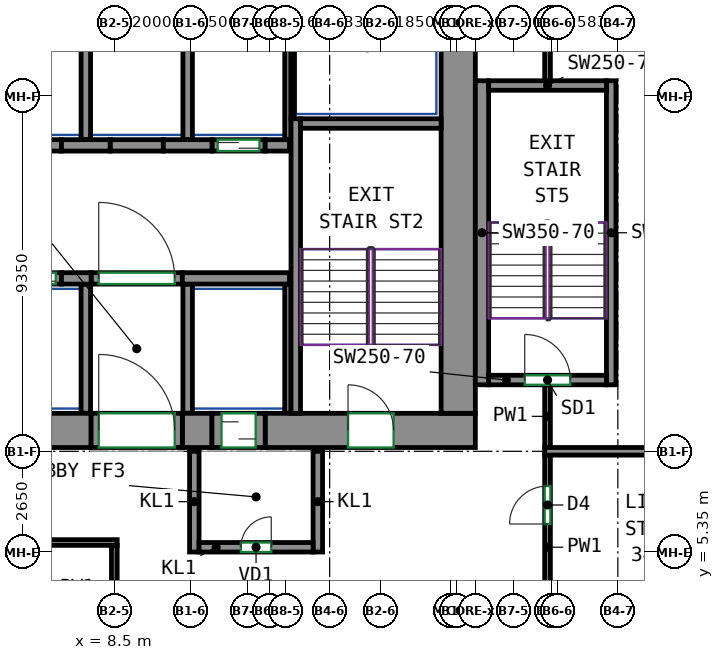
"""IFC4 building model, lengths in metres.
Left out: names, types, materials, properties, quantities, classifications, styles, units other than length and angle.
Written with IfcOpenShell. Run it as: python <this file> out.ifc"""

import sys

from ifc_helpers import new_model, si_unit, direction, frame, frame_2d, origin, place, context, subcontext, project, spatial, rectangle, extrude, source, transform, mapped, element, fill, save


model = new_model("IFC4")
c1 = context("Model", 3, precision=1e-05, world=origin(), true_north=direction((0.0, 1.0)))
c2 = subcontext(c1, "Body", "Model", "MODEL_VIEW")
j1 = project(units=[si_unit("LENGTHUNIT", "METRE"), si_unit("PLANEANGLEUNIT", "RADIAN")], contexts=[c1])
p1 = place(None, origin())
s1 = spatial("IfcSite", under=j1, at=p1, CompositionType="ELEMENT")
p2 = place(p1, origin())
s2 = spatial("IfcBuilding", under=s1, at=p2, CompositionType="ELEMENT")
p3 = place(p2, frame((0.0, 0.0, 150.7)))
s3 = spatial("IfcBuildingStorey", under=s2, at=p3, CompositionType="ELEMENT", Elevation=150.7)
m1 = source(origin(), c2, "Body", "SweptSolid", [
    extrude(rectangle(XDim=14.18, YDim=0.9, at=frame_2d((7.09, 0.0))), origin(), (0.0, 0.0, 1.0), 3.12),
])
p4 = place(p3, frame((-6.29, 8.55, 0.0), z_axis=(0.0, 0.0, 1.0), x_axis=(1.0, 0.0, 0.0)))
e1 = element("IfcWall", 1, at=p4, inside=s3, PredefinedType="SHEAR", context=c2, shape_type="MappedRepresentation", body=[
    mapped(m1, transform((0.0, 0.0, 0.0))),
])
m2 = source(origin(), c2, "Body", "SweptSolid", [
    extrude(rectangle(XDim=0.78, YDim=0.9, at=frame_2d((0.39, 0.0))), origin(), (0.0, 0.0, 1.0), 3.12),
])
p5 = place(p3, frame((10.29, 8.55, 0.0), z_axis=(0.0, 0.0, 1.0), x_axis=(1.0, 0.0, 0.0)))
e2 = element("IfcWall", 2, at=p5, inside=s3, PredefinedType="SHEAR", context=c2, shape_type="MappedRepresentation", body=[
    mapped(m2, transform((0.0, 0.0, 0.0))),
])
m3 = source(origin(), c2, "Body", "SweptSolid", [
    extrude(rectangle(XDim=5.53, YDim=0.9, at=frame_2d((2.765, 0.0))), origin(), (0.0, 0.0, 1.0), 3.12),
])
p6 = place(p3, frame((12.47, 8.55, 0.0), z_axis=(0.0, 0.0, 1.0), x_axis=(1.0, 0.0, 0.0)))
e3 = element("IfcWall", 3, at=p6, inside=s3, PredefinedType="SHEAR", context=c2, shape_type="MappedRepresentation", body=[
    mapped(m3, transform((0.0, 0.0, 0.0))),
])
p7 = place(p6, frame((2.18, 0.0, 0.0)))
e4 = element("IfcOpeningElement", 4, at=p7, cuts=e3, PredefinedType="OPENING", context=c2, shape_type="SweptSolid", body=[
    extrude(rectangle(XDim=1.2, YDim=2.1, at=frame_2d((0.6, 1.05))), frame((0.0, 0.46, 0.0), z_axis=(0.0, -1.0, 0.0), x_axis=(1.0, 0.0, 0.0)), (0.0, 0.0, 1.0), 0.92),
])
m4 = source(origin(), c2, "Body", "SweptSolid", [
    extrude(rectangle(XDim=12.0, YDim=0.9, at=frame_2d((6.0, 0.0))), origin(), (0.0, 0.0, 1.0), 3.12),
])
p8 = place(p3, frame((17.55, 9.0, 0.0), z_axis=(0.0, 0.0, 1.0), x_axis=(0.0, 1.0, 0.0)))
e5 = element("IfcWall", 5, at=p8, inside=s3, PredefinedType="SHEAR", context=c2, shape_type="MappedRepresentation", body=[
    mapped(m4, transform((0.0, 0.0, 0.0))),
])
m5 = source(origin(), c2, "Body", "SweptSolid", [
    extrude(rectangle(XDim=7.75, YDim=0.25, at=frame_2d((3.875, 0.0))), origin(), (0.0, 0.0, 1.0), 3.12),
])
p9 = place(p3, frame((13.275, 9.0, 0.0), z_axis=(0.0, 0.0, 1.0), x_axis=(0.0, 1.0, 0.0)))
e6 = element("IfcWall", 6, at=p9, inside=s3, PredefinedType="SHEAR", context=c2, shape_type="MappedRepresentation", body=[
    mapped(m5, transform((0.0, 0.0, 0.0))),
])
m6 = source(origin(), c2, "Body", "SweptSolid", [
    extrude(rectangle(XDim=3.7, YDim=0.25, at=frame_2d((1.85, 0.0))), origin(), (0.0, 0.0, 1.0), 3.12),
])
p10 = place(p3, frame((13.4, 16.625, 0.0), z_axis=(0.0, 0.0, 1.0), x_axis=(1.0, 0.0, 0.0)))
e7 = element("IfcWall", 7, at=p10, inside=s3, PredefinedType="SHEAR", context=c2, shape_type="MappedRepresentation", body=[
    mapped(m6, transform((0.0, 0.0, 0.0))),
])
m7 = source(origin(), c2, "Body", "SweptSolid", [
    extrude(rectangle(XDim=8.0, YDim=0.35, at=frame_2d((4.0, 0.0))), origin(), (0.0, 0.0, 1.0), 3.12),
])
p11 = place(p3, frame((18.175, 9.75, 0.0), z_axis=(0.0, 0.0, 1.0), x_axis=(0.0, 1.0, 0.0)))
e8 = element("IfcWall", 8, at=p11, inside=s3, PredefinedType="SHEAR", context=c2, shape_type="MappedRepresentation", body=[
    mapped(m7, transform((0.0, 0.0, 0.0))),
])
m8 = source(origin(), c2, "Body", "SweptSolid", [
    extrude(rectangle(XDim=8.0, YDim=0.25, at=frame_2d((4.0, 0.0))), origin(), (0.0, 0.0, 1.0), 3.12),
])
p12 = place(p3, frame((21.575, 9.75, 0.0), z_axis=(0.0, 0.0, 1.0), x_axis=(0.0, 1.0, 0.0)))
e9 = element("IfcWall", 9, at=p12, inside=s3, PredefinedType="SHEAR", context=c2, shape_type="MappedRepresentation", body=[
    mapped(m8, transform((0.0, 0.0, 0.0))),
])
m9 = source(origin(), c2, "Body", "SweptSolid", [
    extrude(rectangle(XDim=3.1, YDim=0.25, at=frame_2d((1.55, 0.0))), origin(), (0.0, 0.0, 1.0), 3.12),
])
p13 = place(p3, frame((18.35, 9.875, 0.0), z_axis=(0.0, 0.0, 1.0), x_axis=(1.0, 0.0, 0.0)))
e10 = element("IfcWall", 10, at=p13, inside=s3, PredefinedType="SHEAR", context=c2, shape_type="MappedRepresentation", body=[
    mapped(m9, transform((0.0, 0.0, 0.0))),
])
p14 = place(p13, frame((0.95, 0.0, 0.0)))
e11 = element("IfcOpeningElement", 11, at=p14, cuts=e10, PredefinedType="OPENING", context=c2, shape_type="SweptSolid", body=[
    extrude(rectangle(XDim=1.2, YDim=2.1, at=frame_2d((0.6, 1.05))), frame((0.0, 0.135, 0.0), z_axis=(0.0, -1.0, 0.0), x_axis=(1.0, 0.0, 0.0)), (0.0, 0.0, 1.0), 0.27),
])
p15 = place(p3, frame((18.35, 17.625, 0.0), z_axis=(0.0, 0.0, 1.0), x_axis=(1.0, 0.0, 0.0)))
e12 = element("IfcWall", 12, at=p15, inside=s3, PredefinedType="SHEAR", context=c2, shape_type="MappedRepresentation", body=[
    mapped(m9, transform((0.0, 0.0, 0.0))),
])
m10 = source(origin(), c2, "Body", "SweptSolid", [
    extrude(rectangle(XDim=0.78, YDim=0.3, at=frame_2d((0.39, 0.0))), origin(), (0.0, 0.0, 1.0), 3.12),
])
p16 = place(p3, frame((7.11, 12.55, 0.0), z_axis=(0.0, 0.0, 1.0), x_axis=(1.0, 0.0, 0.0)))
e13 = element("IfcWall", 13, at=p16, inside=s3, PredefinedType="SHEAR", context=c2, shape_type="MappedRepresentation", body=[
    mapped(m10, transform((0.0, 0.0, 0.0))),
])
m11 = source(origin(), c2, "Body", "SweptSolid", [
    extrude(rectangle(XDim=2.82, YDim=0.3, at=frame_2d((1.41, 0.0))), origin(), (0.0, 0.0, 1.0), 3.12),
])
p17 = place(p3, frame((10.29, 12.55, 0.0), z_axis=(0.0, 0.0, 1.0), x_axis=(1.0, 0.0, 0.0)))
e14 = element("IfcWall", 14, at=p17, inside=s3, PredefinedType="SHEAR", context=c2, shape_type="MappedRepresentation", body=[
    mapped(m11, transform((0.0, 0.0, 0.0))),
])
m12 = source(origin(), c2, "Body", "SweptSolid", [
    extrude(rectangle(XDim=1.28, YDim=0.3, at=frame_2d((0.64, 0.0))), origin(), (0.0, 0.0, 1.0), 3.12),
])
p18 = place(p3, frame((7.11, 16.05, 0.0), z_axis=(0.0, 0.0, 1.0), x_axis=(1.0, 0.0, 0.0)))
e15 = element("IfcWall", 15, at=p18, inside=s3, PredefinedType="SHEAR", context=c2, shape_type="MappedRepresentation", body=[
    mapped(m12, transform((0.0, 0.0, 0.0))),
])
m13 = source(origin(), c2, "Body", "SweptSolid", [
    extrude(rectangle(XDim=1.28, YDim=0.3, at=frame_2d((0.64, 0.0))), origin(), (0.0, 0.0, 1.0), 3.12),
])
p19 = place(p3, frame((9.79, 16.05, 0.0), z_axis=(0.0, 0.0, 1.0), x_axis=(1.0, 0.0, 0.0)))
e16 = element("IfcWall", 16, at=p19, inside=s3, PredefinedType="SHEAR", context=c2, shape_type="MappedRepresentation", body=[
    mapped(m13, transform((0.0, 0.0, 0.0))),
])
m14 = source(origin(), c2, "Body", "SweptSolid", [
    extrude(rectangle(XDim=0.64, YDim=0.3, at=frame_2d((0.32, 0.0))), origin(), (0.0, 0.0, 1.0), 3.12),
])
p20 = place(p3, frame((12.47, 16.05, 0.0), z_axis=(0.0, 0.0, 1.0), x_axis=(1.0, 0.0, 0.0)))
e17 = element("IfcWall", 17, at=p20, inside=s3, PredefinedType="SHEAR", context=c2, shape_type="MappedRepresentation", body=[
    mapped(m14, transform((0.0, 0.0, 0.0))),
])
m15 = source(origin(), c2, "Body", "SweptSolid", [
    extrude(rectangle(XDim=1.4, YDim=0.3, at=frame_2d((0.7, 0.0))), origin(), (0.0, 0.0, 1.0), 3.12),
])
p21 = place(p3, frame((5.71, 12.55, 0.0), z_axis=(0.0, 0.0, 1.0), x_axis=(1.0, 0.0, 0.0)))
e18 = element("IfcWall", 18, at=p21, inside=s3, PredefinedType="PARTITIONING", context=c2, shape_type="MappedRepresentation", body=[
    mapped(m15, transform((0.0, 0.0, 0.0))),
])
p22 = place(p21, frame((0.15, 0.0, 0.0)))
e19 = element("IfcOpeningElement", 19, at=p22, cuts=e18, PredefinedType="OPENING", context=c2, shape_type="SweptSolid", body=[
    extrude(rectangle(XDim=1.1, YDim=2.1, at=frame_2d((0.55, 1.05))), frame((0.0, 0.16, 0.0), z_axis=(0.0, -1.0, 0.0), x_axis=(1.0, 0.0, 0.0)), (0.0, 0.0, 1.0), 0.32),
])
m16 = source(origin(), c2, "Body", "SweptSolid", [
    extrude(rectangle(XDim=1.4, YDim=0.3, at=frame_2d((0.7, 0.0))), origin(), (0.0, 0.0, 1.0), 3.12),
])
p23 = place(p3, frame((11.07, 16.05, 0.0), z_axis=(0.0, 0.0, 1.0), x_axis=(1.0, 0.0, 0.0)))
e20 = element("IfcWall", 20, at=p23, inside=s3, PredefinedType="PARTITIONING", context=c2, shape_type="MappedRepresentation", body=[
    mapped(m16, transform((0.0, 0.0, 0.0))),
])
p24 = place(p23, frame((0.15, 0.0, 0.0)))
e21 = element("IfcOpeningElement", 21, at=p24, cuts=e20, PredefinedType="OPENING", context=c2, shape_type="SweptSolid", body=[
    extrude(rectangle(XDim=1.1, YDim=2.1, at=frame_2d((0.55, 1.05))), frame((0.0, 0.16, 0.0), z_axis=(0.0, -1.0, 0.0), x_axis=(1.0, 0.0, 0.0)), (0.0, 0.0, 1.0), 0.32),
])
m17 = source(origin(), c2, "Body", "SweptSolid", [
    extrude(rectangle(XDim=2.4, YDim=0.3, at=frame_2d((1.2, 0.0))), origin(), (0.0, 0.0, 1.0), 3.12),
])
p25 = place(p3, frame((7.89, 12.55, 0.0), z_axis=(0.0, 0.0, 1.0), x_axis=(1.0, 0.0, 0.0)))
e22 = element("IfcWall", 22, at=p25, inside=s3, PredefinedType="PARTITIONING", context=c2, shape_type="MappedRepresentation", body=[
    mapped(m17, transform((0.0, 0.0, 0.0))),
])
p26 = place(p25, frame((0.2, 0.0, 0.0)))
e23 = element("IfcOpeningElement", 23, at=p26, cuts=e22, PredefinedType="OPENING", context=c2, shape_type="SweptSolid", body=[
    extrude(rectangle(XDim=2.0, YDim=2.1, at=frame_2d((1.0, 1.05))), frame((0.0, 0.16, 0.0), z_axis=(0.0, -1.0, 0.0), x_axis=(1.0, 0.0, 0.0)), (0.0, 0.0, 1.0), 0.32),
])
for number, where, z_axis, x_axis in (
    (24, (5.71, 16.05, 0.0), (0.0, 0.0, 1.0), (1.0, 0.0, 0.0)),
    (25, (8.39, 16.05, 0.0), (0.0, 0.0, 1.0), (1.0, 0.0, 0.0)),
):
    element("IfcWall", number, at=place(p3, frame(where, z_axis=z_axis, x_axis=x_axis)), inside=s3, PredefinedType="PARTITIONING", context=c2, shape_type="MappedRepresentation", body=[
        mapped(m15, transform((0.0, 0.0, 0.0))),
    ])
m18 = source(origin(), c2, "Body", "SweptSolid", [
    extrude(rectangle(XDim=2.65, YDim=0.25, at=frame_2d((1.325, 0.0))), origin(), (0.0, 0.0, 1.0), 3.12),
])
for number, where, z_axis, x_axis in (
    (26, (10.605, 5.35, 0.0), (0.0, 0.0, 1.0), (0.0, 1.0, 0.0)),
    (27, (13.855, 5.35, 0.0), (0.0, 0.0, 1.0), (0.0, 1.0, 0.0)),
):
    element("IfcWall", number, at=place(p3, frame(where, z_axis=z_axis, x_axis=x_axis)), inside=s3, PredefinedType="PARTITIONING", context=c2, shape_type="MappedRepresentation", body=[
        mapped(m18, transform((0.0, 0.0, 0.0))),
    ])
m19 = source(origin(), c2, "Body", "SweptSolid", [
    extrude(rectangle(XDim=3.0, YDim=0.25, at=frame_2d((1.5, 0.0))), origin(), (0.0, 0.0, 1.0), 3.12),
])
p27 = place(p3, frame((10.73, 5.475, 0.0), z_axis=(0.0, 0.0, 1.0), x_axis=(1.0, 0.0, 0.0)))
e28 = element("IfcWall", 28, at=p27, inside=s3, PredefinedType="PARTITIONING", context=c2, shape_type="MappedRepresentation", body=[
    mapped(m19, transform((0.0, 0.0, 0.0))),
])
p28 = place(p27, frame((1.1, 0.0, 0.0)))
e29 = element("IfcOpeningElement", 29, at=p28, cuts=e28, PredefinedType="OPENING", context=c2, shape_type="SweptSolid", body=[
    extrude(rectangle(XDim=0.8, YDim=2.0, at=frame_2d((0.4, 1.0))), frame((0.0, 0.135, 0.0), z_axis=(0.0, -1.0, 0.0), x_axis=(1.0, 0.0, 0.0)), (0.0, 0.0, 1.0), 0.27),
])
m20 = source(origin(), c2, "Body", "SweptSolid", [
    extrude(rectangle(XDim=3.275, YDim=0.165, at=frame_2d((1.638, 0.0))), origin(), (0.0, 0.0, 1.0), 3.12),
])
p29 = place(p3, frame((13.067, 16.2, 0.0), z_axis=(0.0, 0.0, 1.0), x_axis=(0.0, 1.0, 0.0)))
e30 = element("IfcWall", 30, at=p29, inside=s3, PredefinedType="PARTITIONING", context=c2, shape_type="MappedRepresentation", body=[
    mapped(m20, transform((0.0, 0.0, 0.0))),
])
m21 = source(origin(), c2, "Body", "SweptSolid", [
    extrude(rectangle(XDim=3.275, YDim=0.25, at=frame_2d((1.638, 0.0))), origin(), (0.0, 0.0, 1.0), 3.12),
])
p30 = place(p3, frame((10.43, 16.2, 0.0), z_axis=(0.0, 0.0, 1.0), x_axis=(0.0, 1.0, 0.0)))
e31 = element("IfcWall", 31, at=p30, inside=s3, PredefinedType="PARTITIONING", context=c2, shape_type="MappedRepresentation", body=[
    mapped(m21, transform((0.0, 0.0, 0.0))),
])
m22 = source(origin(), c2, "Body", "SweptSolid", [
    extrude(rectangle(XDim=2.725, YDim=0.085, at=frame_2d((1.363, 0.0))), origin(), (0.0, 0.0, 1.0), 3.12),
])
p31 = place(p3, frame((13.192, 16.75, 0.0), z_axis=(0.0, 0.0, 1.0), x_axis=(0.0, 1.0, 0.0)))
e32 = element("IfcWall", 32, at=p31, inside=s3, PredefinedType="PARTITIONING", context=c2, shape_type="MappedRepresentation", body=[
    mapped(m22, transform((0.0, 0.0, 0.0))),
])
p32 = place(p3, frame((7.75, 16.2, 0.0), z_axis=(0.0, 0.0, 1.0), x_axis=(0.0, 1.0, 0.0)))
e33 = element("IfcWall", 33, at=p32, inside=s3, PredefinedType="PARTITIONING", context=c2, shape_type="MappedRepresentation", body=[
    mapped(m21, transform((0.0, 0.0, 0.0))),
])
m23 = source(origin(), c2, "Body", "SweptSolid", [
    extrude(rectangle(XDim=3.4, YDim=0.25, at=frame_2d((1.7, 0.0))), origin(), (0.0, 0.0, 1.0), 3.12),
])
p33 = place(p3, frame((10.43, 9.0, 0.0), z_axis=(0.0, 0.0, 1.0), x_axis=(0.0, 1.0, 0.0)))
e34 = element("IfcWall", 34, at=p33, inside=s3, PredefinedType="PARTITIONING", context=c2, shape_type="MappedRepresentation", body=[
    mapped(m23, transform((0.0, 0.0, 0.0))),
])
m24 = source(origin(), c2, "Body", "SweptSolid", [
    extrude(rectangle(XDim=3.4, YDim=0.165, at=frame_2d((1.7, 0.0))), origin(), (0.0, 0.0, 1.0), 3.12),
])
p34 = place(p3, frame((13.067, 9.0, 0.0), z_axis=(0.0, 0.0, 1.0), x_axis=(0.0, 1.0, 0.0)))
e35 = element("IfcWall", 35, at=p34, inside=s3, PredefinedType="PARTITIONING", context=c2, shape_type="MappedRepresentation", body=[
    mapped(m24, transform((0.0, 0.0, 0.0))),
])
p35 = place(p3, frame((7.75, 9.0, 0.0), z_axis=(0.0, 0.0, 1.0), x_axis=(0.0, 1.0, 0.0)))
e36 = element("IfcWall", 36, at=p35, inside=s3, PredefinedType="PARTITIONING", context=c2, shape_type="MappedRepresentation", body=[
    mapped(m23, transform((0.0, 0.0, 0.0))),
])
m25 = source(origin(), c2, "Body", "SweptSolid", [
    extrude(rectangle(XDim=2.4, YDim=0.9, at=frame_2d((1.2, 0.0))), origin(), (0.0, 0.0, 1.0), 2.7),
])
p36 = place(p3, frame((7.89, 8.55, 0.0), z_axis=(0.0, 0.0, 1.0), x_axis=(1.0, 0.0, 0.0)))
e37 = element("IfcWall", 37, at=p36, inside=s3, PredefinedType="PARTITIONING", context=c2, shape_type="MappedRepresentation", body=[
    mapped(m25, transform((0.0, 0.0, 0.0))),
])
p37 = place(p36, frame((0.2, 0.0, 0.0)))
e38 = element("IfcOpeningElement", 38, at=p37, cuts=e37, PredefinedType="OPENING", context=c2, shape_type="SweptSolid", body=[
    extrude(rectangle(XDim=2.0, YDim=2.1, at=frame_2d((1.0, 1.05))), frame((0.0, 0.46, 0.0), z_axis=(0.0, -1.0, 0.0), x_axis=(1.0, 0.0, 0.0)), (0.0, 0.0, 1.0), 0.92),
])
m26 = source(origin(), c2, "Body", "SweptSolid", [
    extrude(rectangle(XDim=1.4, YDim=0.9, at=frame_2d((0.7, 0.0))), origin(), (0.0, 0.0, 1.0), 2.7),
])
p38 = place(p3, frame((11.07, 8.55, 0.0), z_axis=(0.0, 0.0, 1.0), x_axis=(1.0, 0.0, 0.0)))
e39 = element("IfcWall", 39, at=p38, inside=s3, PredefinedType="PARTITIONING", context=c2, shape_type="MappedRepresentation", body=[
    mapped(m26, transform((0.0, 0.0, 0.0))),
])
p39 = place(p38, frame((0.25, 0.0, 0.0)))
e40 = element("IfcOpeningElement", 40, at=p39, cuts=e39, PredefinedType="OPENING", context=c2, shape_type="SweptSolid", body=[
    extrude(rectangle(XDim=0.9, YDim=2.1, at=frame_2d((0.45, 1.05))), frame((0.0, 0.46, 0.0), z_axis=(0.0, -1.0, 0.0), x_axis=(1.0, 0.0, 0.0)), (0.0, 0.0, 1.0), 0.92),
])
p40 = place(p3, frame((19.9, 4.434, 0.0), z_axis=(0.0, 0.0, 1.0), x_axis=(0.0, 1.0, 0.0)))
e41 = element("IfcWall", 41, at=p40, inside=s3, PredefinedType="PARTITIONING", context=c2, shape_type="SweptSolid", body=[
    extrude(rectangle(XDim=3.476, YDim=0.15, at=frame_2d((1.738, 0.0))), origin(), (0.0, 0.0, 1.0), 3.12),
])
p41 = place(p40, frame((1.653, 0.0, 0.0)))
e42 = element("IfcOpeningElement", 42, at=p41, cuts=e41, PredefinedType="OPENING", context=c2, shape_type="SweptSolid", body=[
    extrude(rectangle(XDim=1.0, YDim=2.1, at=frame_2d((0.5, 1.05))), frame((0.0, 0.085, 0.0), z_axis=(0.0, -1.0, 0.0), x_axis=(1.0, 0.0, 0.0)), (0.0, 0.0, 1.0), 0.17),
])
p42 = place(p3, frame((19.9, 17.75, 0.0), z_axis=(0.0, 0.0, 1.0), x_axis=(0.0, 1.0, 0.0)))
e43 = element("IfcWall", 43, at=p42, inside=s3, PredefinedType="PARTITIONING", context=c2, shape_type="SweptSolid", body=[
    extrude(rectangle(XDim=4.175, YDim=0.15, at=frame_2d((2.087, 0.0))), origin(), (0.0, 0.0, 1.0), 3.12),
])
p43 = place(p42, frame((1.432, 0.0, 0.0)))
e44 = element("IfcOpeningElement", 44, at=p43, cuts=e43, PredefinedType="OPENING", context=c2, shape_type="SweptSolid", body=[
    extrude(rectangle(XDim=0.9, YDim=2.1, at=frame_2d((0.45, 1.05))), frame((0.0, 0.085, 0.0), z_axis=(0.0, -1.0, 0.0), x_axis=(1.0, 0.0, 0.0)), (0.0, 0.0, 1.0), 0.17),
])
p44 = place(p3, frame((19.9, 8.09, 0.0), z_axis=(0.0, 0.0, 1.0), x_axis=(0.0, 1.0, 0.0)))
e45 = element("IfcWall", 45, at=p44, inside=s3, PredefinedType="PARTITIONING", context=c2, shape_type="SweptSolid", body=[
    extrude(rectangle(XDim=1.66, YDim=0.15, at=frame_2d((0.83, 0.0))), origin(), (0.0, 0.0, 1.0), 3.12),
])
p45 = place(p3, frame((8.5, 5.525, 0.0), z_axis=(0.0, 0.0, 1.0), x_axis=(0.0, -1.0, 0.0)))
e46 = element("IfcWall", 46, at=p45, inside=s3, PredefinedType="PARTITIONING", context=c2, shape_type="SweptSolid", body=[
    extrude(rectangle(XDim=2.25, YDim=0.15, at=frame_2d((1.125, 0.0))), origin(), (0.0, 0.0, 1.0), 3.12),
])
p46 = place(p3, frame((-5.4, 5.6, 0.0), z_axis=(0.0, 0.0, 1.0), x_axis=(1.0, 0.0, 0.0)))
e47 = element("IfcWall", 47, at=p46, inside=s3, PredefinedType="PARTITIONING", context=c2, shape_type="SweptSolid", body=[
    extrude(rectangle(XDim=13.975, YDim=0.15, at=frame_2d((6.987, 0.0))), origin(), (0.0, 0.0, 1.0), 3.12),
])
p47 = place(p46, frame((4.626, 0.0, 0.0)))
e48 = element("IfcOpeningElement", 48, at=p47, cuts=e47, PredefinedType="OPENING", context=c2, shape_type="SweptSolid", body=[
    extrude(rectangle(XDim=1.0, YDim=2.1, at=frame_2d((0.5, 1.05))), frame((0.0, 0.085, 0.0), z_axis=(0.0, -1.0, 0.0), x_axis=(1.0, 0.0, 0.0)), (0.0, 0.0, 1.0), 0.17),
])
p48 = place(p3, frame((19.827, 8.0, 0.0), z_axis=(0.0, 0.0, 1.0), x_axis=(1.0, 0.0, 0.0)))
e49 = element("IfcWall", 49, at=p48, inside=s3, PredefinedType="PARTITIONING", context=c2, shape_type="SweptSolid", body=[
    extrude(rectangle(XDim=4.573, YDim=0.2, at=frame_2d((2.287, 0.0))), origin(), (0.0, 0.0, 1.0), 3.12),
])
p49 = place(p26, origin())
e50 = element("IfcDoor", 50, at=p49, inside=s3, OperationType="DOUBLE_DOOR_SINGLE_SWING", PredefinedType="DOOR", context=c2, shape_type="SweptSolid", body=[
    extrude(rectangle(XDim=2.0, YDim=2.1, at=frame_2d((1.0, 1.05))), frame((0.0, 0.025, 0.0), z_axis=(0.0, -1.0, 0.0), x_axis=(1.0, 0.0, 0.0)), (0.0, 0.0, 1.0), 0.05),
])
fill(e23, e50)
p50 = place(p37, origin())
e51 = element("IfcDoor", 51, at=p50, inside=s3, OperationType="DOUBLE_DOOR_SINGLE_SWING", PredefinedType="DOOR", context=c2, shape_type="SweptSolid", body=[
    extrude(rectangle(XDim=2.0, YDim=2.1, at=frame_2d((1.0, 1.05))), frame((0.0, 0.355, 0.0), z_axis=(0.0, -1.0, 0.0), x_axis=(1.0, 0.0, 0.0)), (0.0, 0.0, 1.0), 0.05),
])
fill(e38, e51)
p51 = place(p28, origin())
e52 = element("IfcDoor", 52, at=p51, inside=s3, OperationType="SINGLE_SWING_RIGHT", PredefinedType="DOOR", context=c2, shape_type="SweptSolid", body=[
    extrude(rectangle(XDim=0.8, YDim=2.0, at=frame_2d((0.4, 1.0))), frame((0.0, 0.025, 0.0), z_axis=(0.0, -1.0, 0.0), x_axis=(1.0, 0.0, 0.0)), (0.0, 0.0, 1.0), 0.05),
])
fill(e29, e52)
p52 = place(p39, origin())
e53 = element("IfcDoor", 53, at=p52, inside=s3, OperationType="SLIDING_TO_LEFT", PredefinedType="DOOR", context=c2, shape_type="SweptSolid", body=[
    extrude(rectangle(XDim=0.9, YDim=2.1, at=frame_2d((0.45, 1.05))), frame((0.0, 0.355, 0.0), z_axis=(0.0, -1.0, 0.0), x_axis=(1.0, 0.0, 0.0)), (0.0, 0.0, 1.0), 0.05),
])
fill(e40, e53)
p53 = place(p22, origin())
e54 = element("IfcDoor", 54, at=p53, inside=s3, OperationType="DOUBLE_DOOR_SLIDING", PredefinedType="DOOR", context=c2, shape_type="SweptSolid", body=[
    extrude(rectangle(XDim=1.1, YDim=2.1, at=frame_2d((0.55, 1.05))), frame((0.0, 0.025, 0.0), z_axis=(0.0, -1.0, 0.0), x_axis=(1.0, 0.0, 0.0)), (0.0, 0.0, 1.0), 0.05),
])
fill(e19, e54)
p54 = place(p24, origin())
e55 = element("IfcDoor", 55, at=p54, inside=s3, OperationType="DOUBLE_DOOR_SLIDING", PredefinedType="DOOR", context=c2, shape_type="SweptSolid", body=[
    extrude(rectangle(XDim=1.1, YDim=2.1, at=frame_2d((0.55, 1.05))), frame((0.0, 0.025, 0.0), z_axis=(0.0, -1.0, 0.0), x_axis=(1.0, 0.0, 0.0)), (0.0, 0.0, 1.0), 0.05),
])
fill(e21, e55)
p55 = place(p7, origin())
e56 = element("IfcDoor", 56, at=p55, inside=s3, OperationType="DOUBLE_DOOR_SINGLE_SWING", PredefinedType="DOOR", context=c2, shape_type="SweptSolid", body=[
    extrude(rectangle(XDim=1.2, YDim=2.1, at=frame_2d((0.6, 1.05))), frame((0.0, 0.355, 0.0), z_axis=(0.0, -1.0, 0.0), x_axis=(1.0, 0.0, 0.0)), (0.0, 0.0, 1.0), 0.05),
])
fill(e4, e56)
p56 = place(p14, origin())
e57 = element("IfcDoor", 57, at=p56, inside=s3, OperationType="DOUBLE_DOOR_SINGLE_SWING", PredefinedType="DOOR", context=c2, shape_type="SweptSolid", body=[
    extrude(rectangle(XDim=1.2, YDim=2.1, at=frame_2d((0.6, 1.05))), frame((0.0, 0.025, 0.0), z_axis=(0.0, -1.0, 0.0), x_axis=(1.0, 0.0, 0.0)), (0.0, 0.0, 1.0), 0.05),
])
fill(e11, e57)
p57 = place(p41, origin())
e58 = element("IfcDoor", 58, at=p57, inside=s3, OperationType="SINGLE_SWING_LEFT", PredefinedType="DOOR", context=c2, shape_type="SweptSolid", body=[
    extrude(rectangle(XDim=1.0, YDim=2.1, at=frame_2d((0.5, 1.05))), frame((0.0, 0.025, 0.0), z_axis=(0.0, -1.0, 0.0), x_axis=(1.0, 0.0, 0.0)), (0.0, 0.0, 1.0), 0.05),
])
fill(e42, e58)
save(model, sys.argv[1])
